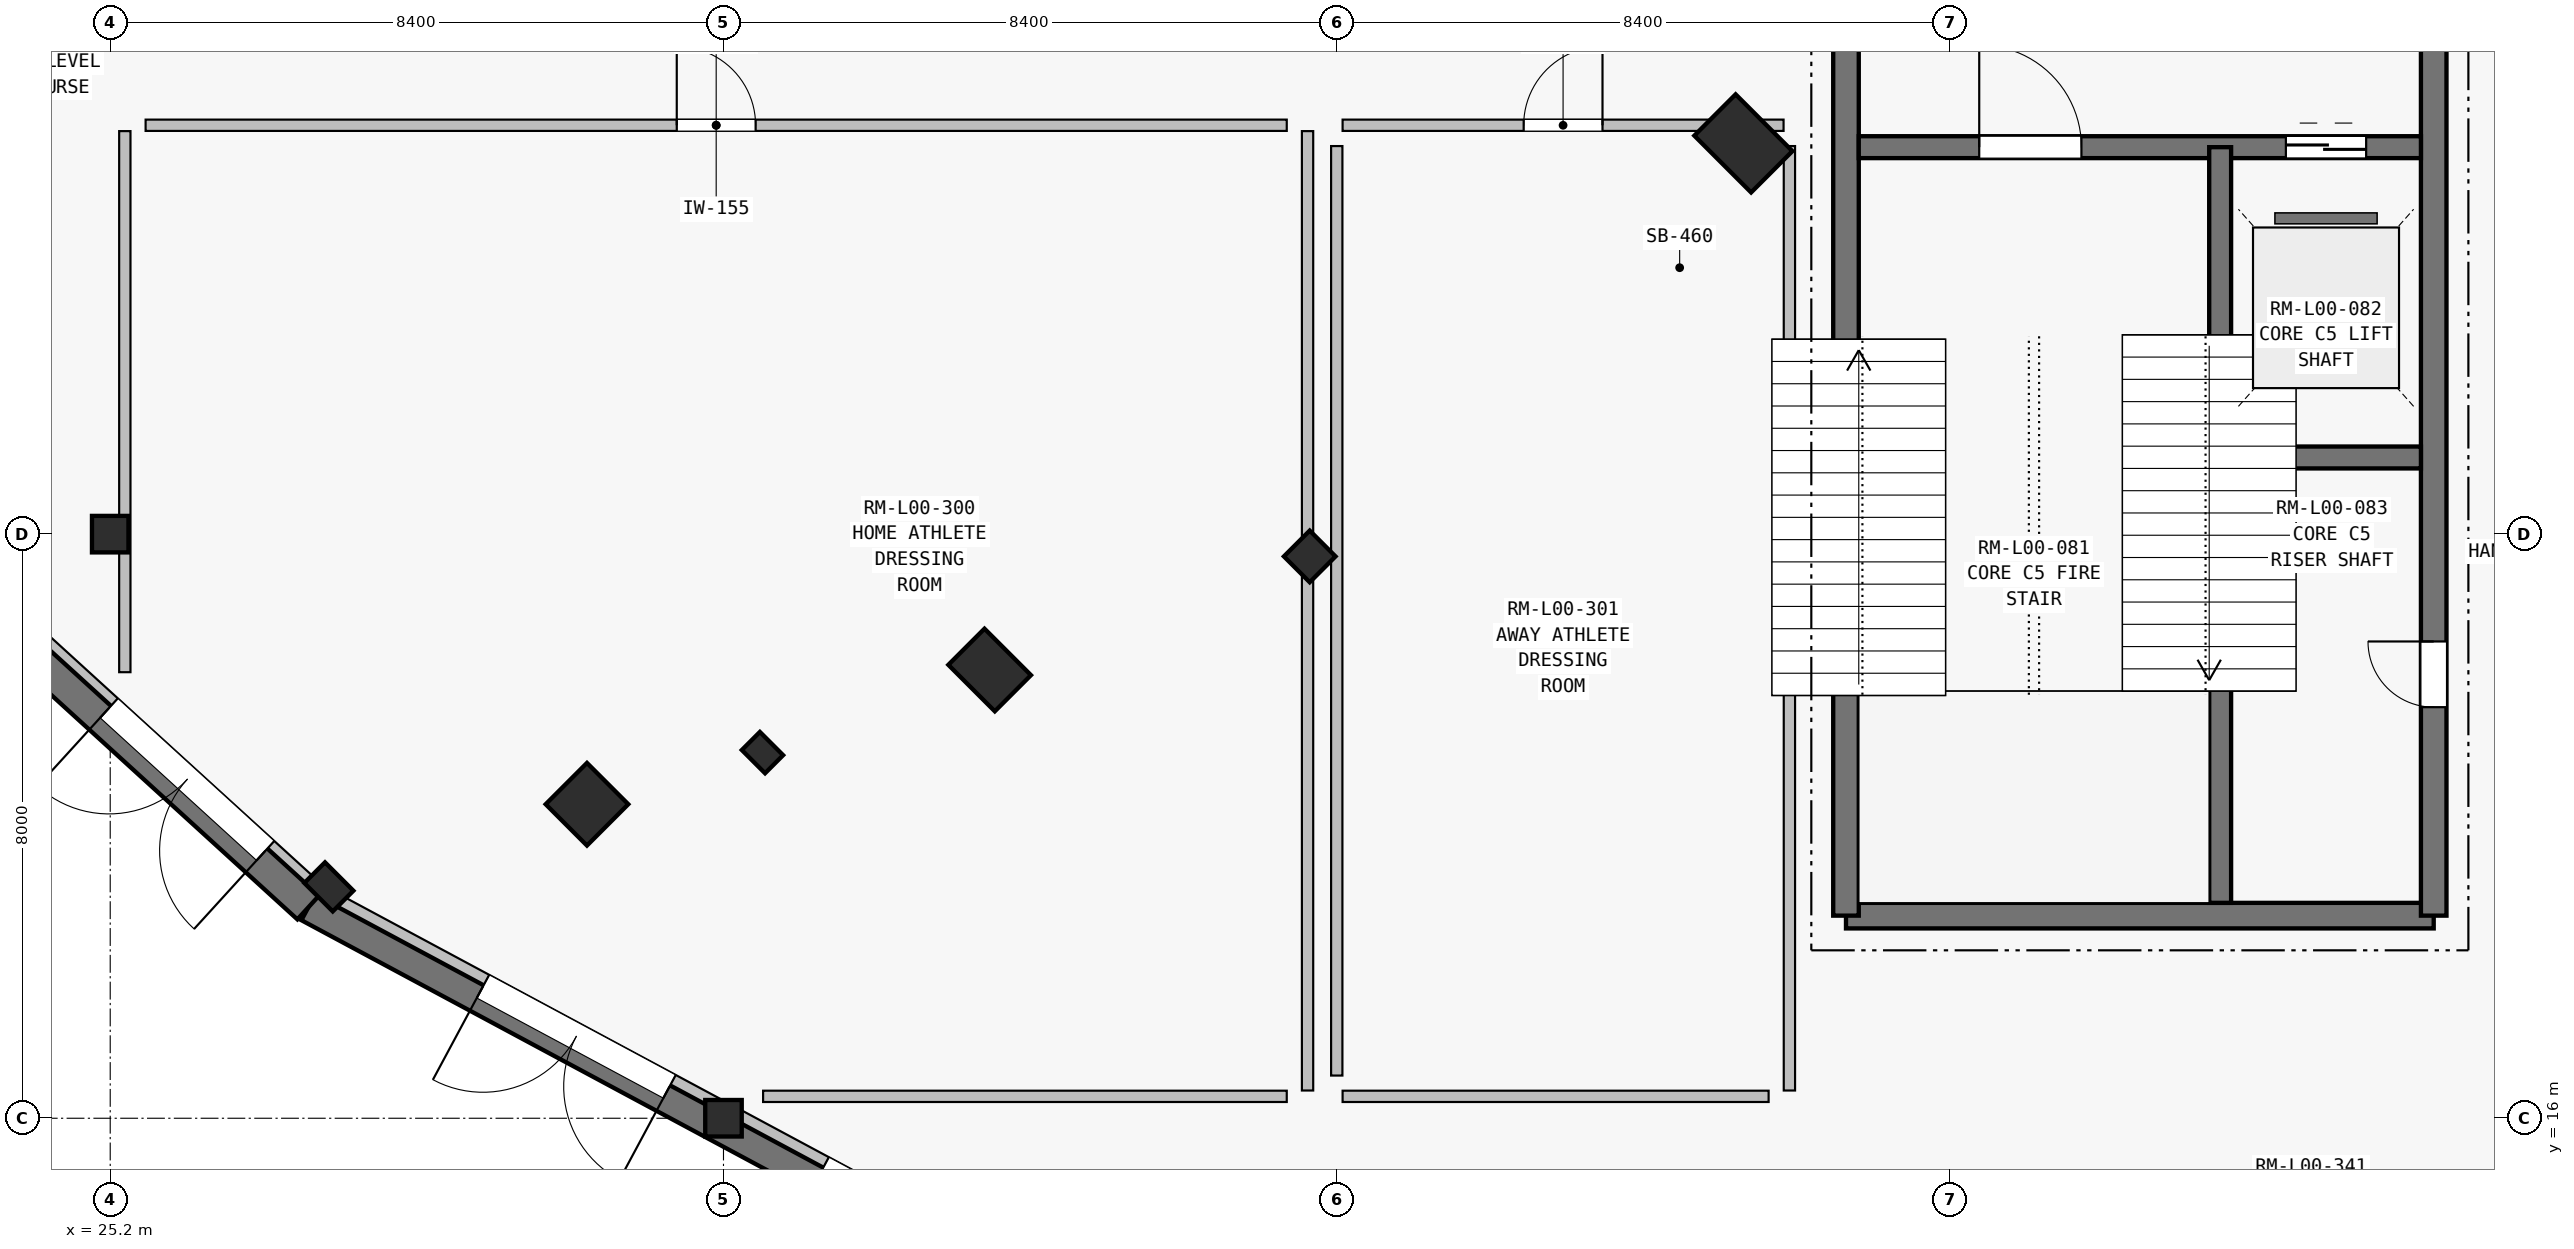
"""IFC4 building model, lengths in metres.
Left out: names, types, materials, properties, quantities, classifications, styles, units other than length and angle.
Written with IfcOpenShell. Run it as: python <this file> out.ifc"""

import sys

from ifc_helpers import new_model, si_unit, direction, frame, frame_2d, origin, origin_2d, place, context, subcontext, project, spatial, rectangle, i_section, extrude, element, fill, save


model = new_model("IFC4")
c1 = context("Model", 3, precision=1e-05, world=origin(), true_north=direction((0.0, 1.0)))
c2 = subcontext(c1, "Body", "Model", "MODEL_VIEW")
j1 = project(units=[si_unit("LENGTHUNIT", "METRE"), si_unit("PLANEANGLEUNIT", "RADIAN")], contexts=[c1])
p1 = place(None, origin())
s1 = spatial("IfcSite", under=j1, at=p1, CompositionType="ELEMENT")
p2 = place(p1, origin())
s2 = spatial("IfcBuilding", under=s1, at=p2, CompositionType="ELEMENT")
p3 = place(p2, origin())
s3 = spatial("IfcBuildingStorey", under=s2, at=p3, CompositionType="ELEMENT", Elevation=0.0)
p4 = place(p3, frame((47.569, 29.352, 0.0), z_axis=(0.0, 0.0, 1.0), x_axis=(-0.707106781187, -0.707106781187, 0.0)))
e1 = element("IfcColumn", 1, at=p4, inside=s3, PredefinedType="COLUMN", context=c2, shape_type="SweptSolid", body=[
    extrude(rectangle(XDim=0.8, YDim=1.1, at=origin_2d()), origin(), (0.0, 0.0, 1.0), 5.4),
])
p5 = place(p3, frame((41.63, 23.695, 0.0), z_axis=(0.0, 0.0, 1.0), x_axis=(-0.707106781187, -0.707106781187, 0.0)))
e2 = element("IfcColumn", 2, at=p5, inside=s3, PredefinedType="COLUMN", context=c2, shape_type="SweptSolid", body=[
    extrude(i_section(OverallWidth=0.5, OverallDepth=0.5, WebThickness=0.02, FlangeThickness=0.035, at=origin_2d()), origin(), (0.0, 0.0, 1.0), 5.4),
])
p6 = place(p3, frame((37.246, 22.139, 0.0), z_axis=(0.0, 0.0, 1.0), x_axis=(-0.707106781187, -0.707106781187, 0.0)))
e3 = element("IfcColumn", 3, at=p6, inside=s3, PredefinedType="COLUMN", context=c2, shape_type="SweptSolid", body=[
    extrude(rectangle(XDim=0.7, YDim=0.9, at=origin_2d()), origin(), (0.0, 0.0, 1.0), 5.4),
])
p7 = place(p3, frame((31.73, 20.301, 0.0), z_axis=(0.0, 0.0, 1.0), x_axis=(-0.707106781187, -0.707106781187, 0.0)))
e4 = element("IfcColumn", 4, at=p7, inside=s3, PredefinedType="COLUMN", context=c2, shape_type="SweptSolid", body=[
    extrude(rectangle(XDim=0.8, YDim=0.8, at=origin_2d()), origin(), (0.0, 0.0, 1.0), 5.4),
])
for number, where, z_axis, x_axis in (
    (5, (25.2, 24.0, 0.0), (0.0, 0.0, 1.0), (1.0, 0.0, 0.0)),
    (6, (33.6, 16.0, 0.0), (0.0, 0.0, 1.0), (1.0, 0.0, 0.0)),
):
    element("IfcColumn", number, at=place(p3, frame(where, z_axis=z_axis, x_axis=x_axis)), inside=s3, PredefinedType="COLUMN", context=c2, shape_type="SweptSolid", body=[
        extrude(i_section(OverallWidth=0.5, OverallDepth=0.5, WebThickness=0.02, FlangeThickness=0.035, at=origin_2d()), origin(), (0.0, 0.0, 1.0), 5.15),
    ])
p8 = place(p3, frame((28.195, 19.169, 0.0), z_axis=(0.0, 0.0, 1.0), x_axis=(-0.707106781187, -0.707106781187, 0.0)))
e7 = element("IfcColumn", 7, at=p8, inside=s3, PredefinedType="PILASTER", context=c2, shape_type="SweptSolid", body=[
    extrude(rectangle(XDim=0.4, YDim=0.55, at=origin_2d()), origin(), (0.0, 0.0, 1.0), 6.35),
])
p9 = place(p3, frame((34.134, 21.008, 0.0), z_axis=(0.0, 0.0, 1.0), x_axis=(-0.707106781187, -0.707106781187, 0.0)))
e8 = element("IfcColumn", 8, at=p9, inside=s3, PredefinedType="PILASTER", context=c2, shape_type="SweptSolid", body=[
    extrude(rectangle(XDim=0.35, YDim=0.45, at=origin_2d()), origin(), (0.0, 0.0, 1.0), 5.4),
])
p10 = place(p3, frame((46.923, 8.886, 0.0), z_axis=(0.0, 0.0, 1.0), x_axis=(-0.88108153149, 0.47296441184, 0.0)))
e9 = element("IfcWall", 9, at=p10, inside=s3, PredefinedType="SOLIDWALL", context=c2, shape_type="SweptSolid", body=[
    extrude(rectangle(XDim=21.524, YDim=0.36, at=frame_2d((10.762, 0.0))), origin(), (0.0, 0.0, 1.0), 5.15),
])
p11 = place(p10, frame((1.22, 0.0, 0.0)))
e10 = element("IfcOpeningElement", 10, at=p11, cuts=e9, PredefinedType="OPENING", context=c2, shape_type="SweptSolid", body=[
    extrude(rectangle(XDim=4.4, YDim=2.75, at=frame_2d((2.2, 1.375))), frame((0.0, 0.19, 0.0), z_axis=(0.0, -1.0, 0.0), x_axis=(1.0, 0.0, 0.0)), (0.0, 0.0, 1.0), 0.38),
])
p12 = place(p10, frame((6.06, 0.0, 0.0)))
e11 = element("IfcOpeningElement", 11, at=p12, cuts=e9, PredefinedType="OPENING", context=c2, shape_type="SweptSolid", body=[
    extrude(rectangle(XDim=4.3, YDim=2.75, at=frame_2d((2.15, 1.375))), frame((0.0, 0.19, 0.0), z_axis=(0.0, -1.0, 0.0), x_axis=(1.0, 0.0, 0.0)), (0.0, 0.0, 1.0), 0.38),
])
p13 = place(p10, frame((10.68, 0.0, 0.0)))
e12 = element("IfcOpeningElement", 12, at=p13, cuts=e9, PredefinedType="OPENING", context=c2, shape_type="SweptSolid", body=[
    extrude(rectangle(XDim=2.9, YDim=2.55, at=frame_2d((1.45, 1.275))), frame((0.0, 0.19, 0.0), z_axis=(0.0, -1.0, 0.0), x_axis=(1.0, 0.0, 0.0)), (0.0, 0.0, 1.0), 0.38),
])
p14 = place(p10, frame((15.96, 0.0, 0.0)))
e13 = element("IfcOpeningElement", 13, at=p14, cuts=e9, PredefinedType="OPENING", context=c2, shape_type="SweptSolid", body=[
    extrude(rectangle(XDim=2.9, YDim=2.55, at=frame_2d((1.45, 1.275))), frame((0.0, 0.19, 0.0), z_axis=(0.0, -1.0, 0.0), x_axis=(1.0, 0.0, 0.0)), (0.0, 0.0, 1.0), 0.38),
])
p15 = place(p3, frame((28.065, 18.99, 0.0), z_axis=(0.0, 0.0, 1.0), x_axis=(-0.73898948924, 0.673716954509, 0.0)))
e14 = element("IfcWall", 14, at=p15, inside=s3, PredefinedType="SOLIDWALL", context=c2, shape_type="SweptSolid", body=[
    extrude(rectangle(XDim=19.551, YDim=0.36, at=frame_2d((9.775, 0.0))), origin(), (0.0, 0.0, 1.0), 5.15),
])
p16 = place(p15, frame((6.5, 0.0, 0.0)))
e15 = element("IfcOpeningElement", 15, at=p16, cuts=e14, PredefinedType="OPENING", context=c2, shape_type="SweptSolid", body=[
    extrude(rectangle(XDim=4.1, YDim=2.7, at=frame_2d((2.05, 1.35))), frame((0.0, 0.19, 0.0), z_axis=(0.0, -1.0, 0.0), x_axis=(1.0, 0.0, 0.0)), (0.0, 0.0, 1.0), 0.38),
])
p17 = place(p15, frame((10.9, 0.0, 0.0)))
e16 = element("IfcOpeningElement", 16, at=p17, cuts=e14, PredefinedType="OPENING", context=c2, shape_type="SweptSolid", body=[
    extrude(rectangle(XDim=4.4, YDim=2.75, at=frame_2d((2.2, 1.375))), frame((0.0, 0.19, 0.0), z_axis=(0.0, -1.0, 0.0), x_axis=(1.0, 0.0, 0.0)), (0.0, 0.0, 1.0), 0.38),
])
p18 = place(p15, frame((1.0, 0.0, 0.0)))
e17 = element("IfcOpeningElement", 17, at=p18, cuts=e14, PredefinedType="OPENING", context=c2, shape_type="SweptSolid", body=[
    extrude(rectangle(XDim=2.9, YDim=2.55, at=frame_2d((1.45, 1.275))), frame((0.0, 0.19, 0.0), z_axis=(0.0, -1.0, 0.0), x_axis=(1.0, 0.0, 0.0)), (0.0, 0.0, 1.0), 0.38),
])
p19 = place(p3, frame((46.8, 8.748, -4.5), z_axis=(0.0, 0.0, 1.0), x_axis=(-0.881081793717, 0.472963923339, 0.0)))
e18 = element("IfcWall", 18, at=p19, inside=s3, PredefinedType="USERDEFINED", context=c2, shape_type="SweptSolid", body=[
    extrude(rectangle(XDim=21.438, YDim=0.395, at=frame_2d((10.719, 0.0))), origin(), (0.0, 0.0, 1.0), 4.5),
])
p20 = place(p3, frame((27.912, 18.887, -4.5), z_axis=(0.0, 0.0, 1.0), x_axis=(-0.738984680234, 0.673722229394, 0.0)))
e19 = element("IfcWall", 19, at=p20, inside=s3, PredefinedType="USERDEFINED", context=c2, shape_type="SweptSolid", body=[
    extrude(rectangle(XDim=19.464, YDim=0.44, at=frame_2d((9.732, 0.0))), origin(), (0.0, 0.0, 1.0), 4.5),
])
p21 = place(p3, frame((48.975, 18.775, 0.0), z_axis=(0.0, 0.0, 1.0), x_axis=(1.0, 0.0, 0.0)))
e20 = element("IfcWall", 20, at=p21, inside=s3, PredefinedType="SHEAR", context=c2, shape_type="SweptSolid", body=[
    extrude(rectangle(XDim=8.05, YDim=0.35, at=frame_2d((4.025, 0.0))), origin(), (0.0, 0.0, 1.0), 5.4),
])
p22 = place(p3, frame((48.975, 18.775, 0.0), z_axis=(0.0, 0.0, 1.0), x_axis=(0.0, 1.0, 0.0)))
e21 = element("IfcWall", 21, at=p22, inside=s3, PredefinedType="SHEAR", context=c2, shape_type="SweptSolid", body=[
    extrude(rectangle(XDim=14.85, YDim=0.35, at=frame_2d((7.425, 0.0))), origin(), (0.0, 0.0, 1.0), 5.4),
])
p23 = place(p3, frame((57.025, 18.775, 0.0), z_axis=(0.0, 0.0, 1.0), x_axis=(0.0, 1.0, 0.0)))
e22 = element("IfcWall", 22, at=p23, inside=s3, PredefinedType="SHEAR", context=c2, shape_type="SweptSolid", body=[
    extrude(rectangle(XDim=14.85, YDim=0.35, at=frame_2d((7.425, 0.0))), origin(), (0.0, 0.0, 1.0), 5.4),
])
p24 = place(p23, frame((2.855, 0.0, 0.0)))
e23 = element("IfcOpeningElement", 23, at=p24, cuts=e22, PredefinedType="OPENING", context=c2, shape_type="SweptSolid", body=[
    extrude(rectangle(XDim=0.9, YDim=2.1, at=frame_2d((0.45, 1.05))), frame((0.0, 0.185, 0.0), z_axis=(0.0, -1.0, 0.0), x_axis=(1.0, 0.0, 0.0)), (0.0, 0.0, 1.0), 0.37),
])
p25 = place(p3, frame((49.15, 29.3, 0.0), z_axis=(0.0, 0.0, 1.0), x_axis=(1.0, 0.0, 0.0)))
e24 = element("IfcWall", 24, at=p25, inside=s3, PredefinedType="SHEAR", context=c2, shape_type="SweptSolid", body=[
    extrude(rectangle(XDim=7.7, YDim=0.3, at=frame_2d((3.85, 0.0))), origin(), (0.0, 0.0, 1.0), 5.4),
])
p26 = place(p25, frame((1.65, 0.0, 0.0)))
e25 = element("IfcOpeningElement", 25, at=p26, cuts=e24, PredefinedType="OPENING", context=c2, shape_type="SweptSolid", body=[
    extrude(rectangle(XDim=1.4, YDim=2.2, at=frame_2d((0.7, 1.1))), frame((0.0, 0.16, 0.0), z_axis=(0.0, -1.0, 0.0), x_axis=(1.0, 0.0, 0.0)), (0.0, 0.0, 1.0), 0.32),
])
p27 = place(p25, frame((5.85, 0.0, 0.0)))
e26 = element("IfcOpeningElement", 26, at=p27, cuts=e24, PredefinedType="OPENING", context=c2, shape_type="SweptSolid", body=[
    extrude(rectangle(XDim=1.1, YDim=2.2, at=frame_2d((0.55, 1.1))), frame((0.0, 0.16, 0.0), z_axis=(0.0, -1.0, 0.0), x_axis=(1.0, 0.0, 0.0)), (0.0, 0.0, 1.0), 0.32),
])
p28 = place(p3, frame((54.1, 18.95, 0.0), z_axis=(0.0, 0.0, 1.0), x_axis=(0.0, 1.0, 0.0)))
e27 = element("IfcWall", 27, at=p28, inside=s3, PredefinedType="SHEAR", context=c2, shape_type="SweptSolid", body=[
    extrude(rectangle(XDim=10.35, YDim=0.3, at=frame_2d((5.175, 0.0))), origin(), (0.0, 0.0, 1.0), 5.4),
])
p29 = place(p3, frame((54.25, 25.05, 0.0), z_axis=(0.0, 0.0, 1.0), x_axis=(1.0, 0.0, 0.0)))
e28 = element("IfcWall", 28, at=p29, inside=s3, PredefinedType="SHEAR", context=c2, shape_type="SweptSolid", body=[
    extrude(rectangle(XDim=2.6, YDim=0.3, at=frame_2d((1.3, 0.0))), origin(), (0.0, 0.0, 1.0), 5.4),
])
p30 = place(p3, frame((41.6, 29.52, 0.0), z_axis=(0.0, 0.0, 1.0), x_axis=(0.0, -1.0, 0.0)))
e29 = element("IfcWall", 29, at=p30, inside=s3, PredefinedType="PARTITIONING", context=c2, shape_type="SweptSolid", body=[
    extrude(rectangle(XDim=13.14, YDim=0.155, at=frame_2d((6.57, 0.0))), origin(), (0.0, 0.0, 1.0), 4.315),
])
p31 = place(p3, frame((41.315, 16.3, 0.0), z_axis=(0.0, 0.0, 1.0), x_axis=(-1.0, 0.0, 0.0)))
e30 = element("IfcWall", 30, at=p31, inside=s3, PredefinedType="PARTITIONING", context=c2, shape_type="SweptSolid", body=[
    extrude(rectangle(XDim=7.173, YDim=0.155, at=frame_2d((3.586, 0.0))), origin(), (0.0, 0.0, 1.0), 5.14),
])
p32 = place(p3, frame((25.4, 22.109, 0.0), z_axis=(0.0, 0.0, 1.0), x_axis=(0.0, 1.0, 0.0)))
e31 = element("IfcWall", 31, at=p32, inside=s3, PredefinedType="PARTITIONING", context=c2, shape_type="SweptSolid", body=[
    extrude(rectangle(XDim=7.411, YDim=0.155, at=frame_2d((3.706, 0.0))), origin(), (0.0, 0.0, 1.0), 5.14),
])
p33 = place(p3, frame((25.685, 29.6, 0.0), z_axis=(0.0, 0.0, 1.0), x_axis=(1.0, 0.0, 0.0)))
e32 = element("IfcWall", 32, at=p33, inside=s3, PredefinedType="PARTITIONING", context=c2, shape_type="SweptSolid", body=[
    extrude(rectangle(XDim=15.63, YDim=0.155, at=frame_2d((7.815, 0.0))), origin(), (0.0, 0.0, 1.0), 4.315),
])
p34 = place(p33, frame((7.275, 0.0, 0.0)))
e33 = element("IfcOpeningElement", 33, at=p34, cuts=e32, PredefinedType="OPENING", context=c2, shape_type="SweptSolid", body=[
    extrude(rectangle(XDim=1.08, YDim=2.15, at=frame_2d((0.54, 1.075))), frame((0.0, 0.087, 0.0), z_axis=(0.0, -1.0, 0.0), x_axis=(1.0, 0.0, 0.0)), (0.0, 0.0, 1.0), 0.175),
])
p35 = place(p3, frame((42.08, 29.6, 0.0), z_axis=(0.0, 0.0, 1.0), x_axis=(1.0, 0.0, 0.0)))
e34 = element("IfcWall", 34, at=p35, inside=s3, PredefinedType="PARTITIONING", context=c2, shape_type="SweptSolid", body=[
    extrude(rectangle(XDim=6.04, YDim=0.155, at=frame_2d((3.02, 0.0))), origin(), (0.0, 0.0, 1.0), 4.503),
])
p36 = place(p35, frame((2.48, 0.0, 0.0)))
e35 = element("IfcOpeningElement", 35, at=p36, cuts=e34, PredefinedType="OPENING", context=c2, shape_type="SweptSolid", body=[
    extrude(rectangle(XDim=1.08, YDim=2.15, at=frame_2d((0.54, 1.075))), frame((0.0, 0.087, 0.0), z_axis=(0.0, -1.0, 0.0), x_axis=(1.0, 0.0, 0.0)), (0.0, 0.0, 1.0), 0.175),
])
p37 = place(p3, frame((48.2, 29.315, 0.0), z_axis=(0.0, 0.0, 1.0), x_axis=(0.0, -1.0, 0.0)))
e36 = element("IfcWall", 36, at=p37, inside=s3, PredefinedType="PARTITIONING", context=c2, shape_type="SweptSolid", body=[
    extrude(rectangle(XDim=12.935, YDim=0.155, at=frame_2d((6.468, 0.0))), origin(), (0.0, 0.0, 1.0), 5.14),
])
p38 = place(p3, frame((47.915, 16.3, 0.0), z_axis=(0.0, 0.0, 1.0), x_axis=(-1.0, 0.0, 0.0)))
e37 = element("IfcWall", 37, at=p38, inside=s3, PredefinedType="PARTITIONING", context=c2, shape_type="SweptSolid", body=[
    extrude(rectangle(XDim=5.835, YDim=0.155, at=frame_2d((2.917, 0.0))), origin(), (0.0, 0.0, 1.0), 5.14),
])
p39 = place(p3, frame((42.0, 16.585, 0.0), z_axis=(0.0, 0.0, 1.0), x_axis=(0.0, 1.0, 0.0)))
e38 = element("IfcWall", 38, at=p39, inside=s3, PredefinedType="PARTITIONING", context=c2, shape_type="SweptSolid", body=[
    extrude(rectangle(XDim=12.73, YDim=0.155, at=frame_2d((6.365, 0.0))), origin(), (0.0, 0.0, 1.0), 4.503),
])
p40 = place(p13, origin())
e39 = element("IfcDoor", 39, at=p40, inside=s3, OperationType="DOUBLE_DOOR_SINGLE_SWING", PredefinedType="DOOR", context=c2, shape_type="SweptSolid", body=[
    extrude(rectangle(XDim=2.9, YDim=2.55, at=frame_2d((1.45, 1.275))), frame((0.0, 0.025, 0.0), z_axis=(0.0, -1.0, 0.0), x_axis=(1.0, 0.0, 0.0)), (0.0, 0.0, 1.0), 0.05),
])
fill(e12, e39)
p41 = place(p14, origin())
e40 = element("IfcDoor", 40, at=p41, inside=s3, OperationType="DOUBLE_DOOR_SINGLE_SWING", PredefinedType="DOOR", context=c2, shape_type="SweptSolid", body=[
    extrude(rectangle(XDim=2.9, YDim=2.55, at=frame_2d((1.45, 1.275))), frame((0.0, 0.025, 0.0), z_axis=(0.0, -1.0, 0.0), x_axis=(1.0, 0.0, 0.0)), (0.0, 0.0, 1.0), 0.05),
])
fill(e13, e40)
p42 = place(p18, origin())
e41 = element("IfcDoor", 41, at=p42, inside=s3, OperationType="DOUBLE_DOOR_SINGLE_SWING", PredefinedType="DOOR", context=c2, shape_type="SweptSolid", body=[
    extrude(rectangle(XDim=2.9, YDim=2.55, at=frame_2d((1.45, 1.275))), frame((0.0, 0.025, 0.0), z_axis=(0.0, -1.0, 0.0), x_axis=(1.0, 0.0, 0.0)), (0.0, 0.0, 1.0), 0.05),
])
fill(e17, e41)
p43 = place(p26, origin())
e42 = element("IfcDoor", 42, at=p43, inside=s3, OperationType="SINGLE_SWING_LEFT", PredefinedType="DOOR", context=c2, shape_type="SweptSolid", body=[
    extrude(rectangle(XDim=1.4, YDim=2.2, at=frame_2d((0.7, 1.1))), frame((0.0, 0.025, 0.0), z_axis=(0.0, -1.0, 0.0), x_axis=(1.0, 0.0, 0.0)), (0.0, 0.0, 1.0), 0.05),
])
fill(e25, e42)
p44 = place(p24, origin())
e43 = element("IfcDoor", 43, at=p44, inside=s3, OperationType="SINGLE_SWING_RIGHT", PredefinedType="DOOR", context=c2, shape_type="SweptSolid", body=[
    extrude(rectangle(XDim=0.9, YDim=2.1, at=frame_2d((0.45, 1.05))), frame((0.0, 0.025, 0.0), z_axis=(0.0, -1.0, 0.0), x_axis=(1.0, 0.0, 0.0)), (0.0, 0.0, 1.0), 0.05),
])
fill(e23, e43)
p45 = place(p27, origin())
e44 = element("IfcDoor", 44, at=p45, inside=s3, OperationType="SLIDING_TO_LEFT", PredefinedType="DOOR", context=c2, shape_type="SweptSolid", body=[
    extrude(rectangle(XDim=1.1, YDim=2.2, at=frame_2d((0.55, 1.1))), frame((0.0, 0.025, 0.0), z_axis=(0.0, -1.0, 0.0), x_axis=(1.0, 0.0, 0.0)), (0.0, 0.0, 1.0), 0.05),
])
fill(e26, e44)
p46 = place(p34, origin())
e45 = element("IfcDoor", 45, at=p46, inside=s3, OperationType="SINGLE_SWING_LEFT", PredefinedType="DOOR", context=c2, shape_type="SweptSolid", body=[
    extrude(rectangle(XDim=1.08, YDim=2.15, at=frame_2d((0.54, 1.075))), frame((0.0, 0.025, 0.0), z_axis=(0.0, -1.0, 0.0), x_axis=(1.0, 0.0, 0.0)), (0.0, 0.0, 1.0), 0.05),
])
fill(e33, e45)
p47 = place(p36, origin())
e46 = element("IfcDoor", 46, at=p47, inside=s3, OperationType="SINGLE_SWING_RIGHT", PredefinedType="DOOR", context=c2, shape_type="SweptSolid", body=[
    extrude(rectangle(XDim=1.08, YDim=2.15, at=frame_2d((0.54, 1.075))), frame((0.0, 0.025, 0.0), z_axis=(0.0, -1.0, 0.0), x_axis=(1.0, 0.0, 0.0)), (0.0, 0.0, 1.0), 0.05),
])
fill(e35, e46)
save(model, sys.argv[1])
